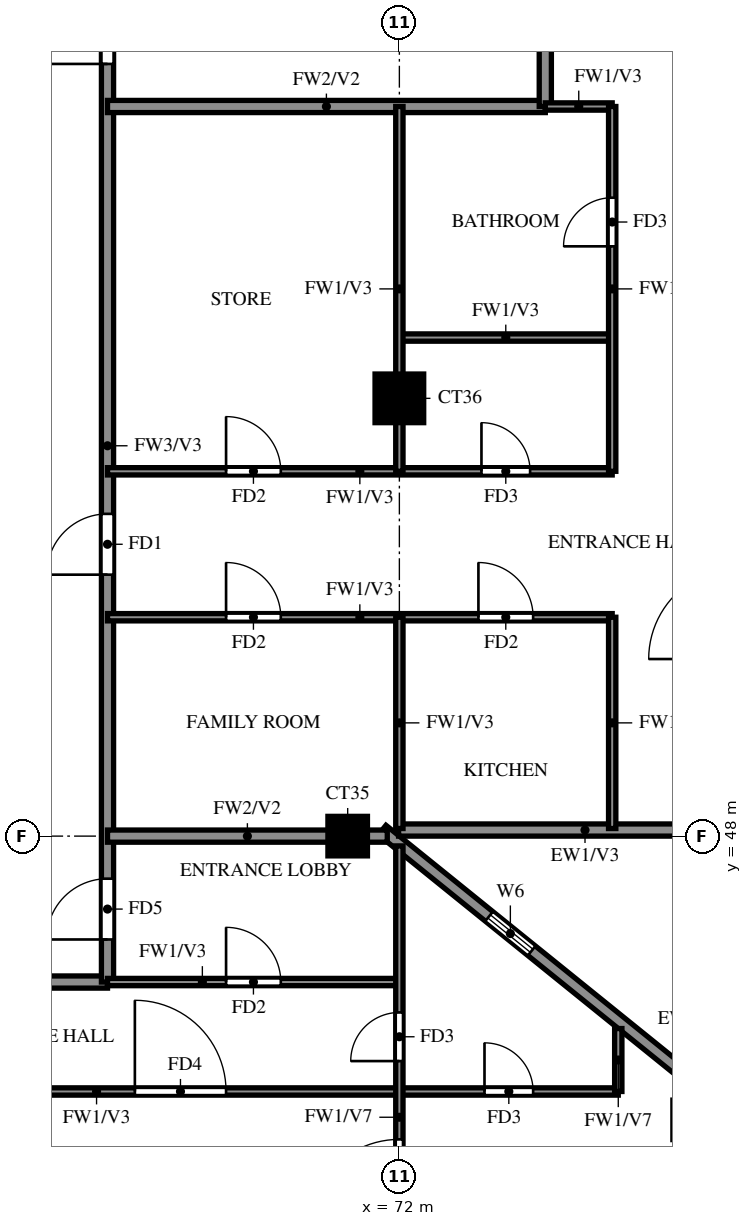
"""IFC4 building model, lengths in metres.
Left out: names, types, materials, properties, quantities, classifications, styles, units other than length and angle.
Written with IfcOpenShell. Run it as: python <this file> out.ifc"""

import sys

from ifc_helpers import new_model, si_unit, direction, frame, frame_2d, origin, origin_2d, place, context, subcontext, project, spatial, rectangle, extrude, source, transform, mapped, element, fill, save


model = new_model("IFC4")
c1 = context("Model", 3, precision=1e-05, world=origin(), true_north=direction((0.0, 1.0)))
c2 = subcontext(c1, "Body", "Model", "MODEL_VIEW")
j1 = project(units=[si_unit("LENGTHUNIT", "METRE"), si_unit("PLANEANGLEUNIT", "RADIAN")], contexts=[c1])
p1 = place(None, origin())
s1 = spatial("IfcSite", under=j1, at=p1, CompositionType="ELEMENT")
p2 = place(p1, origin())
s2 = spatial("IfcBuilding", under=s1, at=p2, CompositionType="ELEMENT")
p3 = place(p2, frame((0.0, 0.0, 239.5)))
s3 = spatial("IfcBuildingStorey", under=s2, at=p3, CompositionType="ELEMENT", Elevation=239.5)
m1 = source(origin(), c2, "Body", "SweptSolid", [
    extrude(rectangle(XDim=0.65, YDim=0.65, at=origin_2d()), origin(), (0.0, 0.0, 1.0), 3.22),
])
for number, where, z_axis, x_axis in (
    (1, (76.823, 43.333, 0.0), (0.0, 0.0, 1.0), (1.0, 0.0, 0.0)),
    (2, (71.15, 48.0, 0.0), (0.0, 0.0, 1.0), (1.0, 0.0, 0.0)),
):
    element("IfcColumn", number, at=place(p3, frame(where, z_axis=z_axis, x_axis=x_axis)), inside=s3, PredefinedType="COLUMN", context=c2, shape_type="MappedRepresentation", body=[
        mapped(m1, transform((0.0, 0.0, 0.0))),
    ])
m2 = source(origin(), c2, "Body", "SweptSolid", [
    extrude(rectangle(XDim=0.8, YDim=0.8, at=origin_2d()), origin(), (0.0, 0.0, 1.0), 3.22),
])
p4 = place(p3, frame((72.0, 55.2, 0.0), z_axis=(0.0, 0.0, 1.0), x_axis=(1.0, 0.0, 0.0)))
e3 = element("IfcColumn", 3, at=p4, inside=s3, PredefinedType="COLUMN", context=c2, shape_type="MappedRepresentation", body=[
    mapped(m2, transform((0.0, 0.0, 0.0))),
])
p5 = place(p3, frame((81.907, 39.87, 0.0), z_axis=(0.0, 0.0, 1.0), x_axis=(-0.777936274417, 0.62834318087, 0.0)))
e4 = element("IfcWall", 4, at=p5, inside=s3, PredefinedType="SOLIDWALL", context=c2, shape_type="SweptSolid", body=[
    extrude(rectangle(XDim=13.099, YDim=0.2, at=frame_2d((6.549, 0.0))), origin(), (0.0, 0.0, 1.0), 3.22),
])
p6 = place(p5, frame((9.938, 0.0, 1.5)))
e5 = element("IfcOpeningElement", 5, at=p6, cuts=e4, PredefinedType="OPENING", context=c2, shape_type="SweptSolid", body=[
    extrude(rectangle(XDim=0.9, YDim=0.9, at=frame_2d((0.45, 0.45))), frame((0.0, 0.11, 0.0), z_axis=(0.0, -1.0, 0.0), x_axis=(1.0, 0.0, 0.0)), (0.0, 0.0, 1.0), 0.22),
])
p7 = place(p3, frame((71.987, 48.1, 0.0), z_axis=(0.0, 0.0, 1.0), x_axis=(1.0, 0.0, 0.0)))
e6 = element("IfcWall", 6, at=p7, inside=s3, PredefinedType="SOLIDWALL", context=c2, shape_type="SweptSolid", body=[
    extrude(rectangle(XDim=6.813, YDim=0.2, at=frame_2d((3.406, 0.0))), origin(), (0.0, 0.0, 1.0), 3.22),
])
p8 = place(p3, frame((60.0, 45.6, 0.0), z_axis=(0.0, 0.0, 1.0), x_axis=(1.0, 0.0, 0.0)))
e7 = element("IfcWall", 7, at=p8, inside=s3, PredefinedType="SOLIDWALL", context=c2, shape_type="SweptSolid", body=[
    extrude(rectangle(XDim=7.2, YDim=0.2, at=frame_2d((3.6, 0.0))), origin(), (0.0, 0.0, 1.0), 3.22),
])
p9 = place(p3, frame((67.2, 45.6, 0.0), z_axis=(0.0, 0.0, 1.0), x_axis=(0.0, 1.0, 0.0)))
e8 = element("IfcWall", 8, at=p9, inside=s3, PredefinedType="SOLIDWALL", context=c2, shape_type="SweptSolid", body=[
    extrude(rectangle(XDim=16.8, YDim=0.2, at=frame_2d((8.4, 0.0))), origin(), (0.0, 0.0, 1.0), 3.22),
])
p10 = place(p9, frame((6.7, 0.0, 0.0)))
e9 = element("IfcOpeningElement", 9, at=p10, cuts=e8, PredefinedType="OPENING", context=c2, shape_type="SweptSolid", body=[
    extrude(rectangle(XDim=1.0, YDim=2.1, at=frame_2d((0.5, 1.05))), frame((0.0, 0.11, 0.0), z_axis=(0.0, -1.0, 0.0), x_axis=(1.0, 0.0, 0.0)), (0.0, 0.0, 1.0), 0.22),
])
p11 = place(p9, frame((15.1, 0.0, 0.0)))
e10 = element("IfcOpeningElement", 10, at=p11, cuts=e8, PredefinedType="OPENING", context=c2, shape_type="SweptSolid", body=[
    extrude(rectangle(XDim=1.0, YDim=2.1, at=frame_2d((0.5, 1.05))), frame((0.0, 0.11, 0.0), z_axis=(0.0, -1.0, 0.0), x_axis=(1.0, 0.0, 0.0)), (0.0, 0.0, 1.0), 0.22),
])
p12 = place(p9, frame((0.7, 0.0, 0.0)))
e11 = element("IfcOpeningElement", 11, at=p12, cuts=e8, PredefinedType="OPENING", context=c2, shape_type="SweptSolid", body=[
    extrude(rectangle(XDim=1.0, YDim=2.1, at=frame_2d((0.5, 1.05))), frame((0.0, 0.11, 0.0), z_axis=(0.0, -1.0, 0.0), x_axis=(1.0, 0.0, 0.0)), (0.0, 0.0, 1.0), 0.22),
])
p13 = place(p3, frame((67.2, 48.0, 0.0), z_axis=(0.0, 0.0, 1.0), x_axis=(1.0, 0.0, 0.0)))
e12 = element("IfcWall", 12, at=p13, inside=s3, PredefinedType="SOLIDWALL", context=c2, shape_type="SweptSolid", body=[
    extrude(rectangle(XDim=4.601, YDim=0.2, at=frame_2d((2.301, 0.0))), origin(), (0.0, 0.0, 1.0), 3.22),
])
p14 = place(p3, frame((67.2, 60.0, 0.0), z_axis=(0.0, 0.0, 1.0), x_axis=(1.0, 0.0, 0.0)))
e13 = element("IfcWall", 13, at=p14, inside=s3, PredefinedType="SOLIDWALL", context=c2, shape_type="SweptSolid", body=[
    extrude(rectangle(XDim=7.2, YDim=0.2, at=frame_2d((3.6, 0.0))), origin(), (0.0, 0.0, 1.0), 3.22),
])
p15 = place(p3, frame((74.4, 60.0, 0.0), z_axis=(0.0, 0.0, 1.0), x_axis=(0.0, 1.0, 0.0)))
e14 = element("IfcWall", 14, at=p15, inside=s3, PredefinedType="SOLIDWALL", context=c2, shape_type="SweptSolid", body=[
    extrude(rectangle(XDim=2.4, YDim=0.2, at=frame_2d((1.2, 0.0))), origin(), (0.0, 0.0, 1.0), 3.22),
])
p16 = place(p3, frame((60.0, 43.8, 0.0), z_axis=(0.0, 0.0, 1.0), x_axis=(1.0, 0.0, 0.0)))
e15 = element("IfcWall", 15, at=p16, inside=s3, PredefinedType="PARTITIONING", context=c2, shape_type="SweptSolid", body=[
    extrude(rectangle(XDim=15.6, YDim=0.12, at=frame_2d((7.8, 0.0))), origin(), (0.0, 0.0, 1.0), 3.22),
])
p17 = place(p16, frame((7.65, 0.0, 0.0)))
e16 = element("IfcOpeningElement", 16, at=p17, cuts=e15, PredefinedType="OPENING", context=c2, shape_type="SweptSolid", body=[
    extrude(rectangle(XDim=1.5, YDim=2.1, at=frame_2d((0.75, 1.05))), frame((0.0, 0.07, 0.0), z_axis=(0.0, -1.0, 0.0), x_axis=(1.0, 0.0, 0.0)), (0.0, 0.0, 1.0), 0.14),
])
p18 = place(p16, frame((1.95, 0.0, 0.0)))
e17 = element("IfcOpeningElement", 17, at=p18, cuts=e15, PredefinedType="OPENING", context=c2, shape_type="SweptSolid", body=[
    extrude(rectangle(XDim=0.9, YDim=2.1, at=frame_2d((0.45, 1.05))), frame((0.0, 0.07, 0.0), z_axis=(0.0, -1.0, 0.0), x_axis=(1.0, 0.0, 0.0)), (0.0, 0.0, 1.0), 0.14),
])
p19 = place(p16, frame((13.4, 0.0, 0.0)))
e18 = element("IfcOpeningElement", 18, at=p19, cuts=e15, PredefinedType="OPENING", context=c2, shape_type="SweptSolid", body=[
    extrude(rectangle(XDim=0.8, YDim=2.1, at=frame_2d((0.4, 1.05))), frame((0.0, 0.07, 0.0), z_axis=(0.0, -1.0, 0.0), x_axis=(1.0, 0.0, 0.0)), (0.0, 0.0, 1.0), 0.14),
])
p20 = place(p3, frame((67.2, 45.6, 0.0), z_axis=(0.0, 0.0, 1.0), x_axis=(1.0, 0.0, 0.0)))
e19 = element("IfcWall", 19, at=p20, inside=s3, PredefinedType="PARTITIONING", context=c2, shape_type="SweptSolid", body=[
    extrude(rectangle(XDim=4.8, YDim=0.12, at=frame_2d((2.4, 0.0))), origin(), (0.0, 0.0, 1.0), 3.22),
])
p21 = place(p20, frame((1.95, 0.0, 0.0)))
e20 = element("IfcOpeningElement", 20, at=p21, cuts=e19, PredefinedType="OPENING", context=c2, shape_type="SweptSolid", body=[
    extrude(rectangle(XDim=0.9, YDim=2.1, at=frame_2d((0.45, 1.05))), frame((0.0, 0.07, 0.0), z_axis=(0.0, -1.0, 0.0), x_axis=(1.0, 0.0, 0.0)), (0.0, 0.0, 1.0), 0.14),
])
p22 = place(p3, frame((67.2, 51.6, 0.0), z_axis=(0.0, 0.0, 1.0), x_axis=(1.0, 0.0, 0.0)))
e21 = element("IfcWall", 21, at=p22, inside=s3, PredefinedType="PARTITIONING", context=c2, shape_type="SweptSolid", body=[
    extrude(rectangle(XDim=8.3, YDim=0.12, at=frame_2d((4.15, 0.0))), origin(), (0.0, 0.0, 1.0), 3.22),
])
p23 = place(p22, frame((6.1, 0.0, 0.0)))
e22 = element("IfcOpeningElement", 22, at=p23, cuts=e21, PredefinedType="OPENING", context=c2, shape_type="SweptSolid", body=[
    extrude(rectangle(XDim=0.9, YDim=2.1, at=frame_2d((0.45, 1.05))), frame((0.0, 0.07, 0.0), z_axis=(0.0, -1.0, 0.0), x_axis=(1.0, 0.0, 0.0)), (0.0, 0.0, 1.0), 0.14),
])
p24 = place(p22, frame((1.95, 0.0, 0.0)))
e23 = element("IfcOpeningElement", 23, at=p24, cuts=e21, PredefinedType="OPENING", context=c2, shape_type="SweptSolid", body=[
    extrude(rectangle(XDim=0.9, YDim=2.1, at=frame_2d((0.45, 1.05))), frame((0.0, 0.07, 0.0), z_axis=(0.0, -1.0, 0.0), x_axis=(1.0, 0.0, 0.0)), (0.0, 0.0, 1.0), 0.14),
])
p25 = place(p3, frame((67.2, 54.0, 0.0), z_axis=(0.0, 0.0, 1.0), x_axis=(1.0, 0.0, 0.0)))
e24 = element("IfcWall", 24, at=p25, inside=s3, PredefinedType="PARTITIONING", context=c2, shape_type="SweptSolid", body=[
    extrude(rectangle(XDim=8.3, YDim=0.12, at=frame_2d((4.15, 0.0))), origin(), (0.0, 0.0, 1.0), 3.22),
])
p26 = place(p25, frame((6.15, 0.0, 0.0)))
e25 = element("IfcOpeningElement", 25, at=p26, cuts=e24, PredefinedType="OPENING", context=c2, shape_type="SweptSolid", body=[
    extrude(rectangle(XDim=0.8, YDim=2.1, at=frame_2d((0.4, 1.05))), frame((0.0, 0.07, 0.0), z_axis=(0.0, -1.0, 0.0), x_axis=(1.0, 0.0, 0.0)), (0.0, 0.0, 1.0), 0.14),
])
p27 = place(p25, frame((1.95, 0.0, 0.0)))
e26 = element("IfcOpeningElement", 26, at=p27, cuts=e24, PredefinedType="OPENING", context=c2, shape_type="SweptSolid", body=[
    extrude(rectangle(XDim=0.9, YDim=2.1, at=frame_2d((0.45, 1.05))), frame((0.0, 0.07, 0.0), z_axis=(0.0, -1.0, 0.0), x_axis=(1.0, 0.0, 0.0)), (0.0, 0.0, 1.0), 0.14),
])
p28 = place(p3, frame((72.0, 56.2, 0.0), z_axis=(0.0, 0.0, 1.0), x_axis=(1.0, 0.0, 0.0)))
e27 = element("IfcWall", 27, at=p28, inside=s3, PredefinedType="PARTITIONING", context=c2, shape_type="SweptSolid", body=[
    extrude(rectangle(XDim=3.5, YDim=0.12, at=frame_2d((1.75, 0.0))), origin(), (0.0, 0.0, 1.0), 3.22),
])
p29 = place(p3, frame((74.4, 60.0, 0.0), z_axis=(0.0, 0.0, 1.0), x_axis=(1.0, 0.0, 0.0)))
e28 = element("IfcWall", 28, at=p29, inside=s3, PredefinedType="PARTITIONING", context=c2, shape_type="SweptSolid", body=[
    extrude(rectangle(XDim=1.1, YDim=0.12, at=frame_2d((0.55, 0.0))), origin(), (0.0, 0.0, 1.0), 3.22),
])
p30 = place(p3, frame((72.0, 39.725, 0.0), z_axis=(0.0, 0.0, 1.0), x_axis=(0.0, 1.0, 0.0)))
e29 = element("IfcWall", 29, at=p30, inside=s3, PredefinedType="PARTITIONING", context=c2, shape_type="SweptSolid", body=[
    extrude(rectangle(XDim=8.114, YDim=0.12, at=frame_2d((4.057, 0.0))), origin(), (0.0, 0.0, 1.0), 2.32),
])
p31 = place(p30, frame((1.788, 0.0, 0.0)))
e30 = element("IfcOpeningElement", 30, at=p31, cuts=e29, PredefinedType="OPENING", context=c2, shape_type="SweptSolid", body=[
    extrude(rectangle(XDim=1.5, YDim=2.1, at=frame_2d((0.75, 1.05))), frame((0.0, 0.07, 0.0), z_axis=(0.0, -1.0, 0.0), x_axis=(1.0, 0.0, 0.0)), (0.0, 0.0, 1.0), 0.14),
])
p32 = place(p30, frame((4.575, 0.0, 0.0)))
e31 = element("IfcOpeningElement", 31, at=p32, cuts=e29, PredefinedType="OPENING", context=c2, shape_type="SweptSolid", body=[
    extrude(rectangle(XDim=0.8, YDim=2.1, at=frame_2d((0.4, 1.05))), frame((0.0, 0.07, 0.0), z_axis=(0.0, -1.0, 0.0), x_axis=(1.0, 0.0, 0.0)), (0.0, 0.0, 1.0), 0.14),
])
p33 = place(p3, frame((72.0, 48.125, 0.0), z_axis=(0.0, 0.0, 1.0), x_axis=(0.0, 1.0, 0.0)))
e32 = element("IfcWall", 32, at=p33, inside=s3, PredefinedType="PARTITIONING", context=c2, shape_type="SweptSolid", body=[
    extrude(rectangle(XDim=3.475, YDim=0.12, at=frame_2d((1.738, 0.0))), origin(), (0.0, 0.0, 1.0), 3.22),
])
p34 = place(p3, frame((72.0, 54.0, 0.0), z_axis=(0.0, 0.0, 1.0), x_axis=(0.0, 1.0, 0.0)))
e33 = element("IfcWall", 33, at=p34, inside=s3, PredefinedType="PARTITIONING", context=c2, shape_type="SweptSolid", body=[
    extrude(rectangle(XDim=6.0, YDim=0.12, at=frame_2d((3.0, 0.0))), origin(), (0.0, 0.0, 1.0), 3.22),
])
p35 = place(p3, frame((75.5, 48.125, 0.0), z_axis=(0.0, 0.0, 1.0), x_axis=(0.0, 1.0, 0.0)))
e34 = element("IfcWall", 34, at=p35, inside=s3, PredefinedType="PARTITIONING", context=c2, shape_type="SweptSolid", body=[
    extrude(rectangle(XDim=3.475, YDim=0.12, at=frame_2d((1.738, 0.0))), origin(), (0.0, 0.0, 1.0), 3.22),
])
p36 = place(p3, frame((75.5, 54.0, 0.0), z_axis=(0.0, 0.0, 1.0), x_axis=(0.0, 1.0, 0.0)))
e35 = element("IfcWall", 35, at=p36, inside=s3, PredefinedType="PARTITIONING", context=c2, shape_type="SweptSolid", body=[
    extrude(rectangle(XDim=6.0, YDim=0.12, at=frame_2d((3.0, 0.0))), origin(), (0.0, 0.0, 1.0), 3.22),
])
p37 = place(p36, frame((3.7, 0.0, 0.0)))
e36 = element("IfcOpeningElement", 36, at=p37, cuts=e35, PredefinedType="OPENING", context=c2, shape_type="SweptSolid", body=[
    extrude(rectangle(XDim=0.8, YDim=2.1, at=frame_2d((0.4, 1.05))), frame((0.0, 0.07, 0.0), z_axis=(0.0, -1.0, 0.0), x_axis=(1.0, 0.0, 0.0)), (0.0, 0.0, 1.0), 0.14),
])
p38 = place(p3, frame((75.6, 43.8, 0.0), z_axis=(0.0, 0.0, 1.0), x_axis=(0.0, 1.0, 0.0)))
e37 = element("IfcWall", 37, at=p38, inside=s3, PredefinedType="PARTITIONING", context=c2, shape_type="SweptSolid", body=[
    extrude(rectangle(XDim=1.035, YDim=0.12, at=frame_2d((0.518, 0.0))), origin(), (0.0, 0.0, 1.0), 2.32),
])
p39 = place(p6, origin())
e38 = element("IfcWindow", 38, at=p39, inside=s3, PartitioningType="SINGLE_PANEL", PredefinedType="WINDOW", context=c2, shape_type="SweptSolid", body=[
    extrude(rectangle(XDim=0.9, YDim=0.9, at=frame_2d((0.45, 0.45))), frame((0.0, 0.03, 0.0), z_axis=(0.0, -1.0, 0.0), x_axis=(1.0, 0.0, 0.0)), (0.0, 0.0, 1.0), 0.06),
])
fill(e5, e38)
p40 = place(p10, origin())
e39 = element("IfcDoor", 39, at=p40, inside=s3, OperationType="SINGLE_SWING_LEFT", PredefinedType="DOOR", context=c2, shape_type="SweptSolid", body=[
    extrude(rectangle(XDim=1.0, YDim=2.1, at=frame_2d((0.5, 1.05))), frame((0.0, 0.025, 0.0), z_axis=(0.0, -1.0, 0.0), x_axis=(1.0, 0.0, 0.0)), (0.0, 0.0, 1.0), 0.05),
])
fill(e9, e39)
p41 = place(p23, origin())
e40 = element("IfcDoor", 40, at=p41, inside=s3, OperationType="SINGLE_SWING_RIGHT", PredefinedType="DOOR", context=c2, shape_type="SweptSolid", body=[
    extrude(rectangle(XDim=0.9, YDim=2.1, at=frame_2d((0.45, 1.05))), frame((0.0, 0.025, 0.0), z_axis=(0.0, -1.0, 0.0), x_axis=(1.0, 0.0, 0.0)), (0.0, 0.0, 1.0), 0.05),
])
fill(e22, e40)
p42 = place(p26, origin())
e41 = element("IfcDoor", 41, at=p42, inside=s3, OperationType="SINGLE_SWING_LEFT", PredefinedType="DOOR", context=c2, shape_type="SweptSolid", body=[
    extrude(rectangle(XDim=0.8, YDim=2.1, at=frame_2d((0.4, 1.05))), frame((0.0, 0.025, 0.0), z_axis=(0.0, -1.0, 0.0), x_axis=(1.0, 0.0, 0.0)), (0.0, 0.0, 1.0), 0.05),
])
fill(e25, e41)
p43 = place(p37, origin())
e42 = element("IfcDoor", 42, at=p43, inside=s3, OperationType="SINGLE_SWING_LEFT", PredefinedType="DOOR", context=c2, shape_type="SweptSolid", body=[
    extrude(rectangle(XDim=0.8, YDim=2.1, at=frame_2d((0.4, 1.05))), frame((0.0, 0.025, 0.0), z_axis=(0.0, -1.0, 0.0), x_axis=(1.0, 0.0, 0.0)), (0.0, 0.0, 1.0), 0.05),
])
fill(e36, e42)
p44 = place(p24, origin())
e43 = element("IfcDoor", 43, at=p44, inside=s3, OperationType="SINGLE_SWING_RIGHT", PredefinedType="DOOR", context=c2, shape_type="SweptSolid", body=[
    extrude(rectangle(XDim=0.9, YDim=2.1, at=frame_2d((0.45, 1.05))), frame((0.0, 0.025, 0.0), z_axis=(0.0, -1.0, 0.0), x_axis=(1.0, 0.0, 0.0)), (0.0, 0.0, 1.0), 0.05),
])
fill(e23, e43)
p45 = place(p27, origin())
e44 = element("IfcDoor", 44, at=p45, inside=s3, OperationType="SINGLE_SWING_LEFT", PredefinedType="DOOR", context=c2, shape_type="SweptSolid", body=[
    extrude(rectangle(XDim=0.9, YDim=2.1, at=frame_2d((0.45, 1.05))), frame((0.0, 0.025, 0.0), z_axis=(0.0, -1.0, 0.0), x_axis=(1.0, 0.0, 0.0)), (0.0, 0.0, 1.0), 0.05),
])
fill(e26, e44)
p46 = place(p11, origin())
e45 = element("IfcDoor", 45, at=p46, inside=s3, OperationType="SINGLE_SWING_LEFT", PredefinedType="DOOR", context=c2, shape_type="SweptSolid", body=[
    extrude(rectangle(XDim=1.0, YDim=2.1, at=frame_2d((0.5, 1.05))), frame((0.0, 0.025, 0.0), z_axis=(0.0, -1.0, 0.0), x_axis=(1.0, 0.0, 0.0)), (0.0, 0.0, 1.0), 0.05),
])
fill(e10, e45)
p47 = place(p21, origin())
e46 = element("IfcDoor", 46, at=p47, inside=s3, OperationType="SINGLE_SWING_RIGHT", PredefinedType="DOOR", context=c2, shape_type="SweptSolid", body=[
    extrude(rectangle(XDim=0.9, YDim=2.1, at=frame_2d((0.45, 1.05))), frame((0.0, 0.025, 0.0), z_axis=(0.0, -1.0, 0.0), x_axis=(1.0, 0.0, 0.0)), (0.0, 0.0, 1.0), 0.05),
])
fill(e20, e46)
p48 = place(p12, origin())
e47 = element("IfcDoor", 47, at=p48, inside=s3, OperationType="SINGLE_SWING_LEFT", PredefinedType="DOOR", context=c2, shape_type="SweptSolid", body=[
    extrude(rectangle(XDim=1.0, YDim=2.1, at=frame_2d((0.5, 1.05))), frame((0.0, 0.025, 0.0), z_axis=(0.0, -1.0, 0.0), x_axis=(1.0, 0.0, 0.0)), (0.0, 0.0, 1.0), 0.05),
])
fill(e11, e47)
p49 = place(p17, origin())
e48 = element("IfcDoor", 48, at=p49, inside=s3, OperationType="SINGLE_SWING_LEFT", PredefinedType="DOOR", context=c2, shape_type="SweptSolid", body=[
    extrude(rectangle(XDim=1.5, YDim=2.1, at=frame_2d((0.75, 1.05))), frame((0.0, 0.025, 0.0), z_axis=(0.0, -1.0, 0.0), x_axis=(1.0, 0.0, 0.0)), (0.0, 0.0, 1.0), 0.05),
])
fill(e16, e48)
p50 = place(p31, origin())
e49 = element("IfcDoor", 49, at=p50, inside=s3, OperationType="SINGLE_SWING_RIGHT", PredefinedType="DOOR", context=c2, shape_type="SweptSolid", body=[
    extrude(rectangle(XDim=1.5, YDim=2.1, at=frame_2d((0.75, 1.05))), frame((0.0, 0.025, 0.0), z_axis=(0.0, -1.0, 0.0), x_axis=(1.0, 0.0, 0.0)), (0.0, 0.0, 1.0), 0.05),
])
fill(e30, e49)
p51 = place(p32, origin())
e50 = element("IfcDoor", 50, at=p51, inside=s3, OperationType="SINGLE_SWING_LEFT", PredefinedType="DOOR", context=c2, shape_type="SweptSolid", body=[
    extrude(rectangle(XDim=0.8, YDim=2.1, at=frame_2d((0.4, 1.05))), frame((0.0, 0.025, 0.0), z_axis=(0.0, -1.0, 0.0), x_axis=(1.0, 0.0, 0.0)), (0.0, 0.0, 1.0), 0.05),
])
fill(e31, e50)
p52 = place(p19, origin())
e51 = element("IfcDoor", 51, at=p52, inside=s3, OperationType="SINGLE_SWING_RIGHT", PredefinedType="DOOR", context=c2, shape_type="SweptSolid", body=[
    extrude(rectangle(XDim=0.8, YDim=2.1, at=frame_2d((0.4, 1.05))), frame((0.0, 0.025, 0.0), z_axis=(0.0, -1.0, 0.0), x_axis=(1.0, 0.0, 0.0)), (0.0, 0.0, 1.0), 0.05),
])
fill(e18, e51)
save(model, sys.argv[1])
